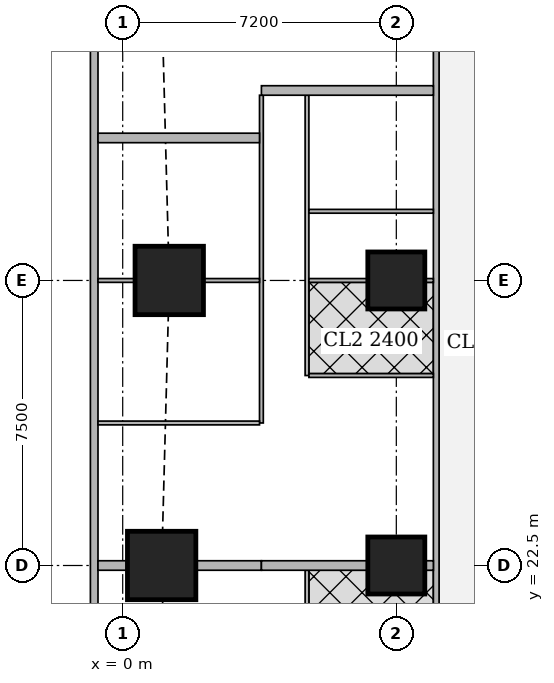
"""IFC4 building model, lengths in metres.
Left out: names, types, materials, properties, quantities, classifications, styles, units other than length and angle.
Written with IfcOpenShell. Run it as: python <this file> out.ifc"""

import sys

from ifc_helpers import new_model, si_unit, direction, frame, frame_2d, origin, origin_2d, place, context, subcontext, project, spatial, rectangle, extrude, element, fill, save


model = new_model("IFC4")
c1 = context("Model", 3, precision=1e-05, world=origin(), true_north=direction((0.0, 1.0)))
c2 = subcontext(c1, "Body", "Model", "MODEL_VIEW")
j1 = project(units=[si_unit("LENGTHUNIT", "METRE"), si_unit("PLANEANGLEUNIT", "RADIAN")], contexts=[c1])
p1 = place(None, origin())
s1 = spatial("IfcSite", under=j1, at=p1, CompositionType="ELEMENT")
p2 = place(p1, origin())
s2 = spatial("IfcBuilding", under=s1, at=p2, CompositionType="ELEMENT")
p3 = place(p2, frame((0.0, 0.0, 169.55)))
s3 = spatial("IfcBuildingStorey", under=s2, at=p3, CompositionType="ELEMENT", Elevation=169.55)
p4 = place(p3, frame((1.025, 22.5, 0.0), z_axis=(0.0, 0.0, 1.0), x_axis=(1.0, 0.0, 0.0)))
e1 = element("IfcColumn", 1, at=p4, inside=s3, PredefinedType="COLUMN", context=c2, shape_type="SweptSolid", body=[
    extrude(rectangle(XDim=1.8, YDim=1.8, at=origin_2d()), origin(), (0.0, 0.0, 1.0), 3.75),
])
p5 = place(p3, frame((7.2, 22.5, 0.0), z_axis=(0.0, 0.0, 1.0), x_axis=(1.0, 0.0, 0.0)))
e2 = element("IfcColumn", 2, at=p5, inside=s3, PredefinedType="COLUMN", context=c2, shape_type="SweptSolid", body=[
    extrude(rectangle(XDim=1.5, YDim=1.5, at=origin_2d()), origin(), (0.0, 0.0, 1.0), 3.75),
])
p6 = place(p3, frame((1.225, 30.0, 0.0), z_axis=(0.0, 0.0, 1.0), x_axis=(1.0, 0.0, 0.0)))
e3 = element("IfcColumn", 3, at=p6, inside=s3, PredefinedType="COLUMN", context=c2, shape_type="SweptSolid", body=[
    extrude(rectangle(XDim=1.8, YDim=1.8, at=origin_2d()), origin(), (0.0, 0.0, 1.0), 3.75),
])
p7 = place(p3, frame((7.2, 30.0, 0.0), z_axis=(0.0, 0.0, 1.0), x_axis=(1.0, 0.0, 0.0)))
e4 = element("IfcColumn", 4, at=p7, inside=s3, PredefinedType="COLUMN", context=c2, shape_type="SweptSolid", body=[
    extrude(rectangle(XDim=1.5, YDim=1.5, at=origin_2d()), origin(), (0.0, 0.0, 1.0), 3.75),
])
p8 = place(p3, frame((-0.75, 42.837, 0.0), z_axis=(0.0, 0.0, 1.0), x_axis=(0.0, -1.0, 0.0)))
e5 = element("IfcWall", 5, at=p8, inside=s3, PredefinedType="SOLIDWALL", context=c2, shape_type="SweptSolid", body=[
    extrude(rectangle(XDim=40.674, YDim=0.2, at=frame_2d((20.337, 0.0))), origin(), (0.0, 0.0, 1.0), 3.5),
])
p9 = place(p8, frame((1.78, 0.0, 0.9)))
e6 = element("IfcOpeningElement", 6, at=p9, cuts=e5, PredefinedType="OPENING", context=c2, shape_type="SweptSolid", body=[
    extrude(rectangle(XDim=1.8, YDim=1.5, at=frame_2d((0.9, 0.75))), frame((0.0, 0.11, 0.0), z_axis=(0.0, -1.0, 0.0), x_axis=(1.0, 0.0, 0.0)), (0.0, 0.0, 1.0), 0.22),
])
p10 = place(p8, frame((6.312, 0.0, 0.9)))
e7 = element("IfcOpeningElement", 7, at=p10, cuts=e5, PredefinedType="OPENING", context=c2, shape_type="SweptSolid", body=[
    extrude(rectangle(XDim=1.8, YDim=1.5, at=frame_2d((0.9, 0.75))), frame((0.0, 0.11, 0.0), z_axis=(0.0, -1.0, 0.0), x_axis=(1.0, 0.0, 0.0)), (0.0, 0.0, 1.0), 0.22),
])
p11 = place(p8, frame((10.062, 0.0, 0.9)))
e8 = element("IfcOpeningElement", 8, at=p11, cuts=e5, PredefinedType="OPENING", context=c2, shape_type="SweptSolid", body=[
    extrude(rectangle(XDim=1.8, YDim=1.5, at=frame_2d((0.9, 0.75))), frame((0.0, 0.11, 0.0), z_axis=(0.0, -1.0, 0.0), x_axis=(1.0, 0.0, 0.0)), (0.0, 0.0, 1.0), 0.22),
])
p12 = place(p8, frame((13.812, 0.0, 0.9)))
e9 = element("IfcOpeningElement", 9, at=p12, cuts=e5, PredefinedType="OPENING", context=c2, shape_type="SweptSolid", body=[
    extrude(rectangle(XDim=1.8, YDim=1.5, at=frame_2d((0.9, 0.75))), frame((0.0, 0.11, 0.0), z_axis=(0.0, -1.0, 0.0), x_axis=(1.0, 0.0, 0.0)), (0.0, 0.0, 1.0), 0.22),
])
p13 = place(p8, frame((17.562, 0.0, 0.9)))
e10 = element("IfcOpeningElement", 10, at=p13, cuts=e5, PredefinedType="OPENING", context=c2, shape_type="SweptSolid", body=[
    extrude(rectangle(XDim=1.8, YDim=1.5, at=frame_2d((0.9, 0.75))), frame((0.0, 0.11, 0.0), z_axis=(0.0, -1.0, 0.0), x_axis=(1.0, 0.0, 0.0)), (0.0, 0.0, 1.0), 0.22),
])
p14 = place(p8, frame((21.312, 0.0, 0.9)))
e11 = element("IfcOpeningElement", 11, at=p14, cuts=e5, PredefinedType="OPENING", context=c2, shape_type="SweptSolid", body=[
    extrude(rectangle(XDim=1.8, YDim=1.5, at=frame_2d((0.9, 0.75))), frame((0.0, 0.11, 0.0), z_axis=(0.0, -1.0, 0.0), x_axis=(1.0, 0.0, 0.0)), (0.0, 0.0, 1.0), 0.22),
])
p15 = place(p8, frame((25.062, 0.0, 0.9)))
e12 = element("IfcOpeningElement", 12, at=p15, cuts=e5, PredefinedType="OPENING", context=c2, shape_type="SweptSolid", body=[
    extrude(rectangle(XDim=1.8, YDim=1.5, at=frame_2d((0.9, 0.75))), frame((0.0, 0.11, 0.0), z_axis=(0.0, -1.0, 0.0), x_axis=(1.0, 0.0, 0.0)), (0.0, 0.0, 1.0), 0.22),
])
p16 = place(p8, frame((28.812, 0.0, 0.9)))
e13 = element("IfcOpeningElement", 13, at=p16, cuts=e5, PredefinedType="OPENING", context=c2, shape_type="SweptSolid", body=[
    extrude(rectangle(XDim=1.8, YDim=1.5, at=frame_2d((0.9, 0.75))), frame((0.0, 0.11, 0.0), z_axis=(0.0, -1.0, 0.0), x_axis=(1.0, 0.0, 0.0)), (0.0, 0.0, 1.0), 0.22),
])
p17 = place(p8, frame((32.562, 0.0, 0.9)))
e14 = element("IfcOpeningElement", 14, at=p17, cuts=e5, PredefinedType="OPENING", context=c2, shape_type="SweptSolid", body=[
    extrude(rectangle(XDim=1.8, YDim=1.5, at=frame_2d((0.9, 0.75))), frame((0.0, 0.11, 0.0), z_axis=(0.0, -1.0, 0.0), x_axis=(1.0, 0.0, 0.0)), (0.0, 0.0, 1.0), 0.22),
])
p18 = place(p8, frame((37.094, 0.0, 0.9)))
e15 = element("IfcOpeningElement", 15, at=p18, cuts=e5, PredefinedType="OPENING", context=c2, shape_type="SweptSolid", body=[
    extrude(rectangle(XDim=1.8, YDim=1.5, at=frame_2d((0.9, 0.75))), frame((0.0, 0.11, 0.0), z_axis=(0.0, -1.0, 0.0), x_axis=(1.0, 0.0, 0.0)), (0.0, 0.0, 1.0), 0.22),
])
p19 = place(p3, frame((8.25, 1.957, 0.0), z_axis=(0.0, 0.0, 1.0), x_axis=(0.0, 1.0, 0.0)))
e16 = element("IfcWall", 16, at=p19, inside=s3, PredefinedType="SOLIDWALL", context=c2, shape_type="SweptSolid", body=[
    extrude(rectangle(XDim=41.111, YDim=0.15, at=frame_2d((20.556, 0.0))), origin(), (0.0, 0.0, 1.0), 3.5),
])
p20 = place(p19, frame((10.642, 0.0, 0.0)))
e17 = element("IfcOpeningElement", 17, at=p20, cuts=e16, PredefinedType="OPENING", context=c2, shape_type="SweptSolid", body=[
    extrude(rectangle(XDim=1.0, YDim=2.1, at=frame_2d((0.5, 1.05))), frame((0.0, 0.085, 0.0), z_axis=(0.0, -1.0, 0.0), x_axis=(1.0, 0.0, 0.0)), (0.0, 0.0, 1.0), 0.17),
])
p21 = place(p19, frame((15.042, 0.0, 0.0)))
e18 = element("IfcOpeningElement", 18, at=p21, cuts=e16, PredefinedType="OPENING", context=c2, shape_type="SweptSolid", body=[
    extrude(rectangle(XDim=1.0, YDim=2.1, at=frame_2d((0.5, 1.05))), frame((0.0, 0.085, 0.0), z_axis=(0.0, -1.0, 0.0), x_axis=(1.0, 0.0, 0.0)), (0.0, 0.0, 1.0), 0.17),
])
p22 = place(p19, frame((22.543, 0.0, 0.0)))
e19 = element("IfcOpeningElement", 19, at=p22, cuts=e16, PredefinedType="OPENING", context=c2, shape_type="SweptSolid", body=[
    extrude(rectangle(XDim=1.0, YDim=2.1, at=frame_2d((0.5, 1.05))), frame((0.0, 0.085, 0.0), z_axis=(0.0, -1.0, 0.0), x_axis=(1.0, 0.0, 0.0)), (0.0, 0.0, 1.0), 0.17),
])
p23 = place(p19, frame((33.142, 0.0, 0.0)))
e20 = element("IfcOpeningElement", 20, at=p23, cuts=e16, PredefinedType="OPENING", context=c2, shape_type="SweptSolid", body=[
    extrude(rectangle(XDim=1.0, YDim=2.1, at=frame_2d((0.5, 1.05))), frame((0.0, 0.085, 0.0), z_axis=(0.0, -1.0, 0.0), x_axis=(1.0, 0.0, 0.0)), (0.0, 0.0, 1.0), 0.17),
])
p24 = place(p3, frame((4.85, 19.999, 0.0), z_axis=(0.0, 0.0, 1.0), x_axis=(0.0, 1.0, 0.0)))
e21 = element("IfcWall", 21, at=p24, inside=s3, PredefinedType="PARTITIONING", context=c2, shape_type="SweptSolid", body=[
    extrude(rectangle(XDim=2.376, YDim=0.1, at=frame_2d((1.188, 0.0))), origin(), (0.0, 0.0, 1.0), 3.5),
])
p25 = place(p24, frame((0.8, 0.0, 0.0)))
e22 = element("IfcOpeningElement", 22, at=p25, cuts=e21, PredefinedType="OPENING", context=c2, shape_type="SweptSolid", body=[
    extrude(rectangle(XDim=0.9, YDim=2.1, at=frame_2d((0.45, 1.05))), frame((0.0, 0.06, 0.0), z_axis=(0.0, -1.0, 0.0), x_axis=(1.0, 0.0, 0.0)), (0.0, 0.0, 1.0), 0.12),
])
p26 = place(p3, frame((3.65, 26.25, 0.0), z_axis=(0.0, 0.0, 1.0), x_axis=(0.0, 1.0, 0.0)))
e23 = element("IfcWall", 23, at=p26, inside=s3, PredefinedType="PARTITIONING", context=c2, shape_type="SweptSolid", body=[
    extrude(rectangle(XDim=8.624, YDim=0.1, at=frame_2d((4.312, 0.0))), origin(), (0.0, 0.0, 1.0), 3.5),
])
p27 = place(p26, frame((1.449, 0.0, 0.0)))
e24 = element("IfcOpeningElement", 24, at=p27, cuts=e23, PredefinedType="OPENING", context=c2, shape_type="SweptSolid", body=[
    extrude(rectangle(XDim=0.9, YDim=2.1, at=frame_2d((0.45, 1.05))), frame((0.0, 0.06, 0.0), z_axis=(0.0, -1.0, 0.0), x_axis=(1.0, 0.0, 0.0)), (0.0, 0.0, 1.0), 0.12),
])
p28 = place(p26, frame((3.95, 0.0, 0.0)))
e25 = element("IfcOpeningElement", 25, at=p28, cuts=e23, PredefinedType="OPENING", context=c2, shape_type="SweptSolid", body=[
    extrude(rectangle(XDim=0.9, YDim=2.1, at=frame_2d((0.45, 1.05))), frame((0.0, 0.06, 0.0), z_axis=(0.0, -1.0, 0.0), x_axis=(1.0, 0.0, 0.0)), (0.0, 0.0, 1.0), 0.12),
])
p29 = place(p3, frame((4.85, 27.499, 0.0), z_axis=(0.0, 0.0, 1.0), x_axis=(0.0, 1.0, 0.0)))
e26 = element("IfcWall", 26, at=p29, inside=s3, PredefinedType="PARTITIONING", context=c2, shape_type="SweptSolid", body=[
    extrude(rectangle(XDim=7.375, YDim=0.1, at=frame_2d((3.688, 0.0))), origin(), (0.0, 0.0, 1.0), 3.5),
])
p30 = place(p29, frame((0.8, 0.0, 0.0)))
e27 = element("IfcOpeningElement", 27, at=p30, cuts=e26, PredefinedType="OPENING", context=c2, shape_type="SweptSolid", body=[
    extrude(rectangle(XDim=0.9, YDim=2.1, at=frame_2d((0.45, 1.05))), frame((0.0, 0.06, 0.0), z_axis=(0.0, -1.0, 0.0), x_axis=(1.0, 0.0, 0.0)), (0.0, 0.0, 1.0), 0.12),
])
p31 = place(p29, frame((2.961, 0.0, 0.0)))
e28 = element("IfcOpeningElement", 28, at=p31, cuts=e26, PredefinedType="OPENING", context=c2, shape_type="SweptSolid", body=[
    extrude(rectangle(XDim=0.9, YDim=2.1, at=frame_2d((0.45, 1.05))), frame((0.0, 0.06, 0.0), z_axis=(0.0, -1.0, 0.0), x_axis=(1.0, 0.0, 0.0)), (0.0, 0.0, 1.0), 0.12),
])
p32 = place(p29, frame((5.461, 0.0, 0.0)))
e29 = element("IfcOpeningElement", 29, at=p32, cuts=e26, PredefinedType="OPENING", context=c2, shape_type="SweptSolid", body=[
    extrude(rectangle(XDim=0.9, YDim=2.1, at=frame_2d((0.45, 1.05))), frame((0.0, 0.06, 0.0), z_axis=(0.0, -1.0, 0.0), x_axis=(1.0, 0.0, 0.0)), (0.0, 0.0, 1.0), 0.12),
])
p33 = place(p3, frame((-0.65, 26.25, 0.0), z_axis=(0.0, 0.0, 1.0), x_axis=(1.0, 0.0, 0.0)))
e30 = element("IfcWall", 30, at=p33, inside=s3, PredefinedType="PARTITIONING", context=c2, shape_type="SweptSolid", body=[
    extrude(rectangle(XDim=4.25, YDim=0.1, at=frame_2d((2.125, 0.0))), origin(), (0.0, 0.0, 1.0), 2.1),
])
p34 = place(p3, frame((-0.65, 30.0, 0.0), z_axis=(0.0, 0.0, 1.0), x_axis=(1.0, 0.0, 0.0)))
e31 = element("IfcWall", 31, at=p34, inside=s3, PredefinedType="PARTITIONING", context=c2, shape_type="SweptSolid", body=[
    extrude(rectangle(XDim=0.974, YDim=0.1, at=frame_2d((0.487, 0.0))), origin(), (0.0, 0.0, 1.0), 3.5),
])
p35 = place(p3, frame((2.126, 30.0, 0.0), z_axis=(0.0, 0.0, 1.0), x_axis=(1.0, 0.0, 0.0)))
e32 = element("IfcWall", 32, at=p35, inside=s3, PredefinedType="PARTITIONING", context=c2, shape_type="SweptSolid", body=[
    extrude(rectangle(XDim=1.474, YDim=0.1, at=frame_2d((0.737, 0.0))), origin(), (0.0, 0.0, 1.0), 3.5),
])
p36 = place(p3, frame((4.9, 27.499, 0.0), z_axis=(0.0, 0.0, 1.0), x_axis=(1.0, 0.0, 0.0)))
e33 = element("IfcWall", 33, at=p36, inside=s3, PredefinedType="PARTITIONING", context=c2, shape_type="SweptSolid", body=[
    extrude(rectangle(XDim=3.275, YDim=0.1, at=frame_2d((1.638, 0.0))), origin(), (0.0, 0.0, 1.0), 3.5),
])
p37 = place(p3, frame((4.9, 30.0, 0.0), z_axis=(0.0, 0.0, 1.0), x_axis=(1.0, 0.0, 0.0)))
e34 = element("IfcWall", 34, at=p37, inside=s3, PredefinedType="PARTITIONING", context=c2, shape_type="SweptSolid", body=[
    extrude(rectangle(XDim=1.549, YDim=0.1, at=frame_2d((0.774, 0.0))), origin(), (0.0, 0.0, 1.0), 3.5),
])
p38 = place(p3, frame((7.951, 30.0, 0.0), z_axis=(0.0, 0.0, 1.0), x_axis=(1.0, 0.0, 0.0)))
e35 = element("IfcWall", 35, at=p38, inside=s3, PredefinedType="PARTITIONING", context=c2, shape_type="SweptSolid", body=[
    extrude(rectangle(XDim=0.224, YDim=0.1, at=frame_2d((0.112, 0.0))), origin(), (0.0, 0.0, 1.0), 3.5),
])
p39 = place(p3, frame((4.9, 31.82, 0.0), z_axis=(0.0, 0.0, 1.0), x_axis=(1.0, 0.0, 0.0)))
e36 = element("IfcWall", 36, at=p39, inside=s3, PredefinedType="PARTITIONING", context=c2, shape_type="SweptSolid", body=[
    extrude(rectangle(XDim=3.275, YDim=0.1, at=frame_2d((1.638, 0.0))), origin(), (0.0, 0.0, 1.0), 3.5),
])
p40 = place(p3, frame((-0.65, 22.5, 0.0), z_axis=(0.0, 0.0, 1.0), x_axis=(1.0, 0.0, 0.0)))
e37 = element("IfcWall", 37, at=p40, inside=s3, PredefinedType="SOLIDWALL", context=c2, shape_type="SweptSolid", body=[
    extrude(rectangle(XDim=0.774, YDim=0.25, at=frame_2d((0.387, 0.0))), origin(), (0.0, 0.0, 1.0), 2.1),
])
p41 = place(p3, frame((1.926, 22.5, 0.0), z_axis=(0.0, 0.0, 1.0), x_axis=(1.0, 0.0, 0.0)))
e38 = element("IfcWall", 38, at=p41, inside=s3, PredefinedType="SOLIDWALL", context=c2, shape_type="SweptSolid", body=[
    extrude(rectangle(XDim=1.724, YDim=0.25, at=frame_2d((0.862, 0.0))), origin(), (0.0, 0.0, 1.0), 2.1),
])
p42 = place(p3, frame((3.65, 22.5, 0.0), z_axis=(0.0, 0.0, 1.0), x_axis=(1.0, 0.0, 0.0)))
e39 = element("IfcWall", 39, at=p42, inside=s3, PredefinedType="SOLIDWALL", context=c2, shape_type="SweptSolid", body=[
    extrude(rectangle(XDim=2.799, YDim=0.25, at=frame_2d((1.399, 0.0))), origin(), (0.0, 0.0, 1.0), 3.5),
])
p43 = place(p3, frame((7.951, 22.5, 0.0), z_axis=(0.0, 0.0, 1.0), x_axis=(1.0, 0.0, 0.0)))
e40 = element("IfcWall", 40, at=p43, inside=s3, PredefinedType="SOLIDWALL", context=c2, shape_type="SweptSolid", body=[
    extrude(rectangle(XDim=0.224, YDim=0.25, at=frame_2d((0.112, 0.0))), origin(), (0.0, 0.0, 1.0), 3.5),
])
p44 = place(p3, frame((-0.65, 33.75, 0.0), z_axis=(0.0, 0.0, 1.0), x_axis=(1.0, 0.0, 0.0)))
e41 = element("IfcWall", 41, at=p44, inside=s3, PredefinedType="SOLIDWALL", context=c2, shape_type="SweptSolid", body=[
    extrude(rectangle(XDim=4.25, YDim=0.25, at=frame_2d((2.125, 0.0))), origin(), (0.0, 0.0, 1.0), 2.1),
])
p45 = place(p3, frame((3.65, 34.999, 0.0), z_axis=(0.0, 0.0, 1.0), x_axis=(1.0, 0.0, 0.0)))
e42 = element("IfcWall", 42, at=p45, inside=s3, PredefinedType="SOLIDWALL", context=c2, shape_type="SweptSolid", body=[
    extrude(rectangle(XDim=4.525, YDim=0.25, at=frame_2d((2.263, 0.0))), origin(), (0.0, 0.0, 1.0), 3.5),
])
p46 = place(p10, origin())
e43 = element("IfcWindow", 43, at=p46, inside=s3, PartitioningType="SINGLE_PANEL", PredefinedType="WINDOW", context=c2, shape_type="SweptSolid", body=[
    extrude(rectangle(XDim=1.8, YDim=1.5, at=frame_2d((0.9, 0.75))), frame((0.0, 0.03, 0.0), z_axis=(0.0, -1.0, 0.0), x_axis=(1.0, 0.0, 0.0)), (0.0, 0.0, 1.0), 0.06),
])
fill(e7, e43)
p47 = place(p11, origin())
e44 = element("IfcWindow", 44, at=p47, inside=s3, PartitioningType="SINGLE_PANEL", PredefinedType="WINDOW", context=c2, shape_type="SweptSolid", body=[
    extrude(rectangle(XDim=1.8, YDim=1.5, at=frame_2d((0.9, 0.75))), frame((0.0, 0.03, 0.0), z_axis=(0.0, -1.0, 0.0), x_axis=(1.0, 0.0, 0.0)), (0.0, 0.0, 1.0), 0.06),
])
fill(e8, e44)
p48 = place(p12, origin())
e45 = element("IfcWindow", 45, at=p48, inside=s3, PartitioningType="SINGLE_PANEL", PredefinedType="WINDOW", context=c2, shape_type="SweptSolid", body=[
    extrude(rectangle(XDim=1.8, YDim=1.5, at=frame_2d((0.9, 0.75))), frame((0.0, 0.03, 0.0), z_axis=(0.0, -1.0, 0.0), x_axis=(1.0, 0.0, 0.0)), (0.0, 0.0, 1.0), 0.06),
])
fill(e9, e45)
p49 = place(p13, origin())
e46 = element("IfcWindow", 46, at=p49, inside=s3, PartitioningType="SINGLE_PANEL", PredefinedType="WINDOW", context=c2, shape_type="SweptSolid", body=[
    extrude(rectangle(XDim=1.8, YDim=1.5, at=frame_2d((0.9, 0.75))), frame((0.0, 0.03, 0.0), z_axis=(0.0, -1.0, 0.0), x_axis=(1.0, 0.0, 0.0)), (0.0, 0.0, 1.0), 0.06),
])
fill(e10, e46)
p50 = place(p14, origin())
e47 = element("IfcWindow", 47, at=p50, inside=s3, PartitioningType="SINGLE_PANEL", PredefinedType="WINDOW", context=c2, shape_type="SweptSolid", body=[
    extrude(rectangle(XDim=1.8, YDim=1.5, at=frame_2d((0.9, 0.75))), frame((0.0, 0.03, 0.0), z_axis=(0.0, -1.0, 0.0), x_axis=(1.0, 0.0, 0.0)), (0.0, 0.0, 1.0), 0.06),
])
fill(e11, e47)
p51 = place(p25, origin())
e48 = element("IfcDoor", 48, at=p51, inside=s3, OperationType="SINGLE_SWING_LEFT", PredefinedType="DOOR", context=c2, shape_type="SweptSolid", body=[
    extrude(rectangle(XDim=0.9, YDim=2.1, at=frame_2d((0.45, 1.05))), frame((0.0, 0.025, 0.0), z_axis=(0.0, -1.0, 0.0), x_axis=(1.0, 0.0, 0.0)), (0.0, 0.0, 1.0), 0.05),
])
fill(e22, e48)
p52 = place(p27, origin())
e49 = element("IfcDoor", 49, at=p52, inside=s3, OperationType="SINGLE_SWING_LEFT", PredefinedType="DOOR", context=c2, shape_type="SweptSolid", body=[
    extrude(rectangle(XDim=0.9, YDim=2.1, at=frame_2d((0.45, 1.05))), frame((0.0, 0.025, 0.0), z_axis=(0.0, -1.0, 0.0), x_axis=(1.0, 0.0, 0.0)), (0.0, 0.0, 1.0), 0.05),
])
fill(e24, e49)
p53 = place(p28, origin())
e50 = element("IfcDoor", 50, at=p53, inside=s3, OperationType="SINGLE_SWING_LEFT", PredefinedType="DOOR", context=c2, shape_type="SweptSolid", body=[
    extrude(rectangle(XDim=0.9, YDim=2.1, at=frame_2d((0.45, 1.05))), frame((0.0, 0.025, 0.0), z_axis=(0.0, -1.0, 0.0), x_axis=(1.0, 0.0, 0.0)), (0.0, 0.0, 1.0), 0.05),
])
fill(e25, e50)
p54 = place(p30, origin())
e51 = element("IfcDoor", 51, at=p54, inside=s3, OperationType="SINGLE_SWING_RIGHT", PredefinedType="DOOR", context=c2, shape_type="SweptSolid", body=[
    extrude(rectangle(XDim=0.9, YDim=2.1, at=frame_2d((0.45, 1.05))), frame((0.0, 0.025, 0.0), z_axis=(0.0, -1.0, 0.0), x_axis=(1.0, 0.0, 0.0)), (0.0, 0.0, 1.0), 0.05),
])
fill(e27, e51)
p55 = place(p31, origin())
e52 = element("IfcDoor", 52, at=p55, inside=s3, OperationType="SINGLE_SWING_LEFT", PredefinedType="DOOR", context=c2, shape_type="SweptSolid", body=[
    extrude(rectangle(XDim=0.9, YDim=2.1, at=frame_2d((0.45, 1.05))), frame((0.0, 0.025, 0.0), z_axis=(0.0, -1.0, 0.0), x_axis=(1.0, 0.0, 0.0)), (0.0, 0.0, 1.0), 0.05),
])
fill(e28, e52)
p56 = place(p32, origin())
e53 = element("IfcDoor", 53, at=p56, inside=s3, OperationType="SINGLE_SWING_LEFT", PredefinedType="DOOR", context=c2, shape_type="SweptSolid", body=[
    extrude(rectangle(XDim=0.9, YDim=2.1, at=frame_2d((0.45, 1.05))), frame((0.0, 0.025, 0.0), z_axis=(0.0, -1.0, 0.0), x_axis=(1.0, 0.0, 0.0)), (0.0, 0.0, 1.0), 0.05),
])
fill(e29, e53)
p57 = place(p22, origin())
e54 = element("IfcDoor", 54, at=p57, inside=s3, OperationType="SINGLE_SWING_LEFT", PredefinedType="DOOR", context=c2, shape_type="SweptSolid", body=[
    extrude(rectangle(XDim=1.0, YDim=2.1, at=frame_2d((0.5, 1.05))), frame((0.0, 0.025, 0.0), z_axis=(0.0, -1.0, 0.0), x_axis=(1.0, 0.0, 0.0)), (0.0, 0.0, 1.0), 0.05),
])
fill(e19, e54)
p58 = place(p23, origin())
e55 = element("IfcDoor", 55, at=p58, inside=s3, OperationType="SINGLE_SWING_LEFT", PredefinedType="DOOR", context=c2, shape_type="SweptSolid", body=[
    extrude(rectangle(XDim=1.0, YDim=2.1, at=frame_2d((0.5, 1.05))), frame((0.0, 0.025, 0.0), z_axis=(0.0, -1.0, 0.0), x_axis=(1.0, 0.0, 0.0)), (0.0, 0.0, 1.0), 0.05),
])
fill(e20, e55)
save(model, sys.argv[1])
